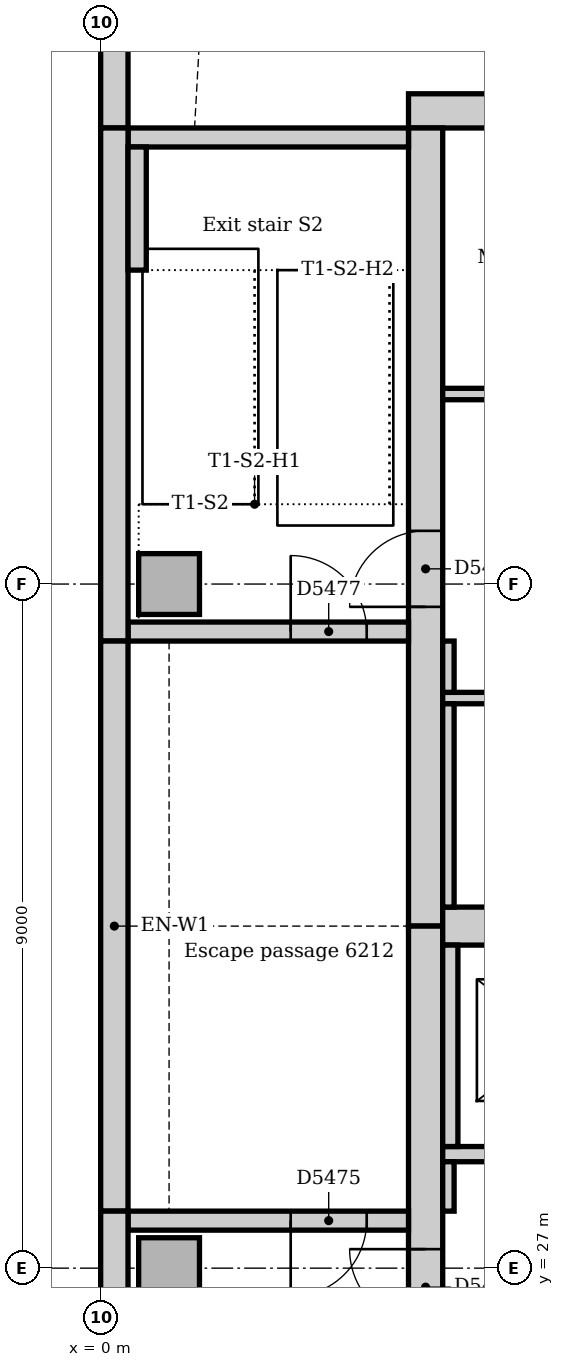
"""IFC4 building model, lengths in metres.
Left out: names, types, materials, properties, quantities, classifications, styles, units other than length and angle.
Written with IfcOpenShell. Run it as: python <this file> out.ifc"""

import sys

from ifc_helpers import new_model, si_unit, direction, frame, frame_2d, origin, origin_2d, place, context, subcontext, project, spatial, rectangle, extrude, element, fill, save


model = new_model("IFC4")
c1 = context("Model", 3, precision=1e-05, world=origin(), true_north=direction((0.0, 1.0)))
c2 = subcontext(c1, "Body", "Model", "MODEL_VIEW")
j1 = project(units=[si_unit("LENGTHUNIT", "METRE"), si_unit("PLANEANGLEUNIT", "RADIAN")], contexts=[c1])
p1 = place(None, origin())
s1 = spatial("IfcSite", under=j1, at=p1, CompositionType="ELEMENT")
p2 = place(p1, origin())
s2 = spatial("IfcBuilding", under=s1, at=p2, CompositionType="ELEMENT")
p3 = place(p2, frame((0.0, 0.0, 259.0)))
s3 = spatial("IfcBuildingStorey", under=s2, at=p3, CompositionType="ELEMENT", Elevation=259.0)
p4 = place(p3, frame((22.95, 42.225, 0.0), z_axis=(0.0, 0.0, 1.0), x_axis=(-1.0, 0.0, 0.0)))
e1 = element("IfcWall", 1, at=p4, inside=s3, PredefinedType="SOLIDWALL", context=c2, shape_type="SweptSolid", body=[
    extrude(rectangle(XDim=18.9, YDim=0.45, at=frame_2d((9.45, 0.0))), origin(), (0.0, 0.0, 1.0), 4.0),
])
p5 = place(p3, frame((4.275, 42.0, 0.0), z_axis=(0.0, 0.0, 1.0), x_axis=(0.0, -1.0, 0.0)))
e2 = element("IfcWall", 2, at=p5, inside=s3, PredefinedType="SOLIDWALL", context=c2, shape_type="SweptSolid", body=[
    extrude(rectangle(XDim=10.5, YDim=0.45, at=frame_2d((5.25, 0.0))), origin(), (0.0, 0.0, 1.0), 4.0),
])
p6 = place(p5, frame((5.3, 0.0, 0.0)))
e3 = element("IfcOpeningElement", 3, at=p6, cuts=e2, PredefinedType="OPENING", context=c2, shape_type="SweptSolid", body=[
    extrude(rectangle(XDim=1.0, YDim=2.1, at=frame_2d((0.5, 1.05))), frame((0.0, 0.235, 0.0), z_axis=(0.0, -1.0, 0.0), x_axis=(1.0, 0.0, 0.0)), (0.0, 0.0, 1.0), 0.47),
])
p7 = place(p3, frame((4.275, 31.5, 0.0), z_axis=(0.0, 0.0, 1.0), x_axis=(0.0, -1.0, 0.0)))
e4 = element("IfcWall", 4, at=p7, inside=s3, PredefinedType="SOLIDWALL", context=c2, shape_type="SweptSolid", body=[
    extrude(rectangle(XDim=10.5, YDim=0.45, at=frame_2d((5.25, 0.0))), origin(), (0.0, 0.0, 1.0), 4.0),
])
p8 = place(p7, frame((4.25, 0.0, 0.0)))
e5 = element("IfcOpeningElement", 5, at=p8, cuts=e4, PredefinedType="OPENING", context=c2, shape_type="SweptSolid", body=[
    extrude(rectangle(XDim=1.0, YDim=2.1, at=frame_2d((0.5, 1.05))), frame((0.0, 0.235, 0.0), z_axis=(0.0, -1.0, 0.0), x_axis=(1.0, 0.0, 0.0)), (0.0, 0.0, 1.0), 0.47),
])
p9 = place(p3, frame((4.5, 31.5, 0.0), z_axis=(0.0, 0.0, 1.0), x_axis=(1.0, 0.0, 0.0)))
e6 = element("IfcWall", 6, at=p9, inside=s3, PredefinedType="SOLIDWALL", context=c2, shape_type="SweptSolid", body=[
    extrude(rectangle(XDim=18.0, YDim=0.5, at=frame_2d((9.0, 0.0))), origin(), (0.0, 0.0, 1.0), 4.0),
])
p10 = place(p3, frame((4.05, 27.625, 0.0), z_axis=(0.0, 0.0, 1.0), x_axis=(-1.0, 0.0, 0.0)))
e7 = element("IfcWall", 7, at=p10, inside=s3, PredefinedType="SOLIDWALL", context=c2, shape_type="SweptSolid", body=[
    extrude(rectangle(XDim=3.69, YDim=0.25, at=frame_2d((1.845, 0.0))), origin(), (0.0, 0.0, 1.0), 4.0),
])
p11 = place(p10, frame((0.55, 0.0, 0.0)))
e8 = element("IfcOpeningElement", 8, at=p11, cuts=e7, PredefinedType="OPENING", context=c2, shape_type="SweptSolid", body=[
    extrude(rectangle(XDim=1.0, YDim=2.1, at=frame_2d((0.5, 1.05))), frame((0.0, 0.135, 0.0), z_axis=(0.0, -1.0, 0.0), x_axis=(1.0, 0.0, 0.0)), (0.0, 0.0, 1.0), 0.27),
])
p12 = place(p3, frame((0.36, 35.375, 0.0), z_axis=(0.0, 0.0, 1.0), x_axis=(1.0, 0.0, 0.0)))
e9 = element("IfcWall", 9, at=p12, inside=s3, PredefinedType="SOLIDWALL", context=c2, shape_type="SweptSolid", body=[
    extrude(rectangle(XDim=3.69, YDim=0.25, at=frame_2d((1.845, 0.0))), origin(), (0.0, 0.0, 1.0), 4.0),
])
p13 = place(p12, frame((2.14, 0.0, 0.0)))
e10 = element("IfcOpeningElement", 10, at=p13, cuts=e9, PredefinedType="OPENING", context=c2, shape_type="SweptSolid", body=[
    extrude(rectangle(XDim=1.0, YDim=2.1, at=frame_2d((0.5, 1.05))), frame((0.0, 0.135, 0.0), z_axis=(0.0, -1.0, 0.0), x_axis=(1.0, 0.0, 0.0)), (0.0, 0.0, 1.0), 0.27),
])
p14 = place(p3, frame((4.05, 41.875, 0.0), z_axis=(0.0, 0.0, 1.0), x_axis=(-1.0, 0.0, 0.0)))
e11 = element("IfcWall", 11, at=p14, inside=s3, PredefinedType="SOLIDWALL", context=c2, shape_type="SweptSolid", body=[
    extrude(rectangle(XDim=3.69, YDim=0.25, at=frame_2d((1.845, 0.0))), origin(), (0.0, 0.0, 1.0), 4.0),
])
for number, where, z_axis, x_axis in (
    (12, (0.9, 27.0, 0.0), (0.0, 0.0, 1.0), (1.0, 0.0, 0.0)),
    (13, (0.9, 36.0, 0.0), (0.0, 0.0, 1.0), (1.0, 0.0, 0.0)),
):
    element("IfcColumn", number, at=place(p3, frame(where, z_axis=z_axis, x_axis=x_axis)), inside=s3, PredefinedType="COLUMN", context=c2, shape_type="SweptSolid", body=[
        extrude(rectangle(XDim=0.8, YDim=0.8, at=origin_2d()), origin(), (0.0, 0.0, 1.0), 4.0),
    ])
p15 = place(p3, frame((0.18, 58.757, 0.0), z_axis=(0.0, 0.0, 1.0), x_axis=(0.0, -1.0, 0.0)))
e14 = element("IfcWall", 14, at=p15, inside=s3, PredefinedType="STANDARD", context=c2, shape_type="SweptSolid", body=[
    extrude(rectangle(XDim=16.757, YDim=0.36, at=frame_2d((8.379, 0.0))), origin(), (0.0, 0.0, 1.0), 3.85),
])
p16 = place(p15, frame((3.107, 0.0, 0.9)))
e15 = element("IfcOpeningElement", 15, at=p16, cuts=e14, PredefinedType="OPENING", context=c2, shape_type="SweptSolid", body=[
    extrude(rectangle(XDim=3.3, YDim=1.6, at=frame_2d((1.65, 0.8))), frame((0.0, 0.19, 0.0), z_axis=(0.0, -1.0, 0.0), x_axis=(1.0, 0.0, 0.0)), (0.0, 0.0, 1.0), 0.38),
])
p17 = place(p15, frame((7.607, 0.0, 0.9)))
e16 = element("IfcOpeningElement", 16, at=p17, cuts=e14, PredefinedType="OPENING", context=c2, shape_type="SweptSolid", body=[
    extrude(rectangle(XDim=3.3, YDim=1.6, at=frame_2d((1.65, 0.8))), frame((0.0, 0.19, 0.0), z_axis=(0.0, -1.0, 0.0), x_axis=(1.0, 0.0, 0.0)), (0.0, 0.0, 1.0), 0.38),
])
p18 = place(p15, frame((12.107, 0.0, 0.9)))
e17 = element("IfcOpeningElement", 17, at=p18, cuts=e14, PredefinedType="OPENING", context=c2, shape_type="SweptSolid", body=[
    extrude(rectangle(XDim=3.3, YDim=1.6, at=frame_2d((1.65, 0.8))), frame((0.0, 0.19, 0.0), z_axis=(0.0, -1.0, 0.0), x_axis=(1.0, 0.0, 0.0)), (0.0, 0.0, 1.0), 0.38),
])
p19 = place(p3, frame((0.18, 42.0, 0.0), z_axis=(0.0, 0.0, 1.0), x_axis=(0.0, -1.0, 0.0)))
e18 = element("IfcWall", 18, at=p19, inside=s3, PredefinedType="STANDARD", context=c2, shape_type="SweptSolid", body=[
    extrude(rectangle(XDim=6.75, YDim=0.36, at=frame_2d((3.375, 0.0))), origin(), (0.0, 0.0, 1.0), 3.85),
])
p20 = place(p3, frame((0.18, 35.25, 0.0), z_axis=(0.0, 0.0, 1.0), x_axis=(0.0, -1.0, 0.0)))
e19 = element("IfcWall", 19, at=p20, inside=s3, PredefinedType="STANDARD", context=c2, shape_type="SweptSolid", body=[
    extrude(rectangle(XDim=7.5, YDim=0.36, at=frame_2d((3.75, 0.0))), origin(), (0.0, 0.0, 1.0), 3.85),
])
p21 = place(p3, frame((0.18, 27.75, 0.0), z_axis=(0.0, 0.0, 1.0), x_axis=(0.0, -1.0, 0.0)))
e20 = element("IfcWall", 20, at=p21, inside=s3, PredefinedType="STANDARD", context=c2, shape_type="SweptSolid", body=[
    extrude(rectangle(XDim=5.507, YDim=0.36, at=frame_2d((2.754, 0.0))), origin(), (0.0, 0.0, 1.0), 3.85),
])
p22 = place(p3, frame((0.48, 40.13, 0.0), z_axis=(0.0, 0.0, 1.0), x_axis=(0.0, 1.0, 0.0)))
e21 = element("IfcWall", 21, at=p22, inside=s3, PredefinedType="STANDARD", context=c2, shape_type="SweptSolid", body=[
    extrude(rectangle(XDim=1.62, YDim=0.24, at=frame_2d((0.81, 0.0))), origin(), (0.0, 0.0, 1.0), 4.0),
])
p23 = place(p3, frame((4.5, 28.5, 0.0), z_axis=(0.0, 0.0, 1.0), x_axis=(1.0, 0.0, 0.0)))
e22 = element("IfcWall", 22, at=p23, inside=s3, PredefinedType="PARTITIONING", context=c2, shape_type="SweptSolid", body=[
    extrude(rectangle(XDim=18.0, YDim=0.2, at=frame_2d((9.0, 0.0))), origin(), (0.0, 0.0, 1.0), 3.85),
])
p24 = place(p23, frame((0.95, 0.0, 0.0)))
e23 = element("IfcOpeningElement", 23, at=p24, cuts=e22, PredefinedType="OPENING", context=c2, shape_type="SweptSolid", body=[
    extrude(rectangle(XDim=1.1, YDim=2.1, at=frame_2d((0.55, 1.05))), frame((0.0, 0.11, 0.0), z_axis=(0.0, -1.0, 0.0), x_axis=(1.0, 0.0, 0.0)), (0.0, 0.0, 1.0), 0.22),
])
p25 = place(p23, frame((3.95, 0.0, 0.0)))
e24 = element("IfcOpeningElement", 24, at=p25, cuts=e22, PredefinedType="OPENING", context=c2, shape_type="SweptSolid", body=[
    extrude(rectangle(XDim=1.1, YDim=2.1, at=frame_2d((0.55, 1.05))), frame((0.0, 0.11, 0.0), z_axis=(0.0, -1.0, 0.0), x_axis=(1.0, 0.0, 0.0)), (0.0, 0.0, 1.0), 0.22),
])
p26 = place(p23, frame((6.95, 0.0, 0.0)))
e25 = element("IfcOpeningElement", 25, at=p26, cuts=e22, PredefinedType="OPENING", context=c2, shape_type="SweptSolid", body=[
    extrude(rectangle(XDim=1.1, YDim=2.1, at=frame_2d((0.55, 1.05))), frame((0.0, 0.11, 0.0), z_axis=(0.0, -1.0, 0.0), x_axis=(1.0, 0.0, 0.0)), (0.0, 0.0, 1.0), 0.22),
])
p27 = place(p23, frame((9.95, 0.0, 0.0)))
e26 = element("IfcOpeningElement", 26, at=p27, cuts=e22, PredefinedType="OPENING", context=c2, shape_type="SweptSolid", body=[
    extrude(rectangle(XDim=1.1, YDim=2.1, at=frame_2d((0.55, 1.05))), frame((0.0, 0.11, 0.0), z_axis=(0.0, -1.0, 0.0), x_axis=(1.0, 0.0, 0.0)), (0.0, 0.0, 1.0), 0.22),
])
p28 = place(p23, frame((12.95, 0.0, 0.0)))
e27 = element("IfcOpeningElement", 27, at=p28, cuts=e22, PredefinedType="OPENING", context=c2, shape_type="SweptSolid", body=[
    extrude(rectangle(XDim=1.1, YDim=2.1, at=frame_2d((0.55, 1.05))), frame((0.0, 0.11, 0.0), z_axis=(0.0, -1.0, 0.0), x_axis=(1.0, 0.0, 0.0)), (0.0, 0.0, 1.0), 0.22),
])
p29 = place(p23, frame((15.95, 0.0, 0.0)))
e28 = element("IfcOpeningElement", 28, at=p29, cuts=e22, PredefinedType="OPENING", context=c2, shape_type="SweptSolid", body=[
    extrude(rectangle(XDim=1.1, YDim=2.1, at=frame_2d((0.55, 1.05))), frame((0.0, 0.11, 0.0), z_axis=(0.0, -1.0, 0.0), x_axis=(1.0, 0.0, 0.0)), (0.0, 0.0, 1.0), 0.22),
])
p30 = place(p3, frame((4.6, 28.6, 0.0), z_axis=(0.0, 0.0, 1.0), x_axis=(0.0, 1.0, 0.0)))
e29 = element("IfcWall", 29, at=p30, inside=s3, PredefinedType="PARTITIONING", context=c2, shape_type="SweptSolid", body=[
    extrude(rectangle(XDim=2.65, YDim=0.2, at=frame_2d((1.325, 0.0))), origin(), (0.0, 0.0, 1.0), 3.85),
])
p31 = place(p3, frame((4.5, 38.5, 0.0), z_axis=(0.0, 0.0, 1.0), x_axis=(1.0, 0.0, 0.0)))
e30 = element("IfcWall", 30, at=p31, inside=s3, PredefinedType="PARTITIONING", context=c2, shape_type="SweptSolid", body=[
    extrude(rectangle(XDim=11.9, YDim=0.15, at=frame_2d((5.95, 0.0))), origin(), (0.0, 0.0, 1.0), 3.85),
])
p32 = place(p31, frame((1.1, 0.0, 0.0)))
e31 = element("IfcOpeningElement", 31, at=p32, cuts=e30, PredefinedType="OPENING", context=c2, shape_type="SweptSolid", body=[
    extrude(rectangle(XDim=0.9, YDim=2.1, at=frame_2d((0.45, 1.05))), frame((0.0, 0.085, 0.0), z_axis=(0.0, -1.0, 0.0), x_axis=(1.0, 0.0, 0.0)), (0.0, 0.0, 1.0), 0.17),
])
p33 = place(p31, frame((4.05, 0.0, 0.0)))
e32 = element("IfcOpeningElement", 32, at=p33, cuts=e30, PredefinedType="OPENING", context=c2, shape_type="SweptSolid", body=[
    extrude(rectangle(XDim=0.9, YDim=2.1, at=frame_2d((0.45, 1.05))), frame((0.0, 0.085, 0.0), z_axis=(0.0, -1.0, 0.0), x_axis=(1.0, 0.0, 0.0)), (0.0, 0.0, 1.0), 0.17),
])
p34 = place(p31, frame((7.05, 0.0, 0.0)))
e33 = element("IfcOpeningElement", 33, at=p34, cuts=e30, PredefinedType="OPENING", context=c2, shape_type="SweptSolid", body=[
    extrude(rectangle(XDim=0.9, YDim=2.1, at=frame_2d((0.45, 1.05))), frame((0.0, 0.085, 0.0), z_axis=(0.0, -1.0, 0.0), x_axis=(1.0, 0.0, 0.0)), (0.0, 0.0, 1.0), 0.17),
])
p35 = place(p31, frame((9.95, 0.0, 0.0)))
e34 = element("IfcOpeningElement", 34, at=p35, cuts=e30, PredefinedType="OPENING", context=c2, shape_type="SweptSolid", body=[
    extrude(rectangle(XDim=0.8, YDim=2.1, at=frame_2d((0.4, 1.05))), frame((0.0, 0.085, 0.0), z_axis=(0.0, -1.0, 0.0), x_axis=(1.0, 0.0, 0.0)), (0.0, 0.0, 1.0), 0.17),
])
p36 = place(p3, frame((4.5, 34.5, 0.0), z_axis=(0.0, 0.0, 1.0), x_axis=(1.0, 0.0, 0.0)))
e35 = element("IfcWall", 35, at=p36, inside=s3, PredefinedType="PARTITIONING", context=c2, shape_type="SweptSolid", body=[
    extrude(rectangle(XDim=5.9, YDim=0.15, at=frame_2d((2.95, 0.0))), origin(), (0.0, 0.0, 1.0), 3.85),
])
p37 = place(p36, frame((2.5, 0.0, 0.0)))
e36 = element("IfcOpeningElement", 36, at=p37, cuts=e35, PredefinedType="OPENING", context=c2, shape_type="SweptSolid", body=[
    extrude(rectangle(XDim=0.9, YDim=2.1, at=frame_2d((0.45, 1.05))), frame((0.0, 0.085, 0.0), z_axis=(0.0, -1.0, 0.0), x_axis=(1.0, 0.0, 0.0)), (0.0, 0.0, 1.0), 0.17),
])
p38 = place(p3, frame((4.575, 34.575, 0.0), z_axis=(0.0, 0.0, 1.0), x_axis=(0.0, 1.0, 0.0)))
e37 = element("IfcWall", 37, at=p38, inside=s3, PredefinedType="PARTITIONING", context=c2, shape_type="SweptSolid", body=[
    extrude(rectangle(XDim=0.675, YDim=0.15, at=frame_2d((0.338, 0.0))), origin(), (0.0, 0.0, 1.0), 3.85),
])
p39 = place(p3, frame((4.575, 31.75, 0.0), z_axis=(0.0, 0.0, 1.0), x_axis=(0.0, 1.0, 0.0)))
e38 = element("IfcWall", 38, at=p39, inside=s3, PredefinedType="PARTITIONING", context=c2, shape_type="SweptSolid", body=[
    extrude(rectangle(XDim=2.675, YDim=0.15, at=frame_2d((1.337, 0.0))), origin(), (0.0, 0.0, 1.0), 3.85),
])
p40 = place(p3, frame((4.575, 27.75, 0.0), z_axis=(0.0, 0.0, 1.0), x_axis=(0.0, 1.0, 0.0)))
e39 = element("IfcWall", 39, at=p40, inside=s3, PredefinedType="PARTITIONING", context=c2, shape_type="SweptSolid", body=[
    extrude(rectangle(XDim=0.65, YDim=0.15, at=frame_2d((0.325, 0.0))), origin(), (0.0, 0.0, 1.0), 3.85),
])
p41 = place(p8, frame((1.0, 0.0, 0.0), z_axis=(0.0, 0.0, 1.0), x_axis=(-1.0, 0.0, 0.0)))
e40 = element("IfcDoor", 40, at=p41, inside=s3, OperationType="SINGLE_SWING_RIGHT", PredefinedType="DOOR", context=c2, shape_type="SweptSolid", body=[
    extrude(rectangle(XDim=1.0, YDim=2.1, at=frame_2d((0.5, 1.05))), frame((0.0, 0.025, 0.0), z_axis=(0.0, -1.0, 0.0), x_axis=(1.0, 0.0, 0.0)), (0.0, 0.0, 1.0), 0.05),
])
fill(e5, e40)
p42 = place(p11, origin())
e41 = element("IfcDoor", 41, at=p42, inside=s3, OperationType="SINGLE_SWING_RIGHT", PredefinedType="DOOR", context=c2, shape_type="SweptSolid", body=[
    extrude(rectangle(XDim=1.0, YDim=2.1, at=frame_2d((0.5, 1.05))), frame((0.0, 0.025, 0.0), z_axis=(0.0, -1.0, 0.0), x_axis=(1.0, 0.0, 0.0)), (0.0, 0.0, 1.0), 0.05),
])
fill(e8, e41)
p43 = place(p6, frame((1.0, 0.0, 0.0), z_axis=(0.0, 0.0, 1.0), x_axis=(-1.0, 0.0, 0.0)))
e42 = element("IfcDoor", 42, at=p43, inside=s3, OperationType="SINGLE_SWING_LEFT", PredefinedType="DOOR", context=c2, shape_type="SweptSolid", body=[
    extrude(rectangle(XDim=1.0, YDim=2.1, at=frame_2d((0.5, 1.05))), frame((0.0, 0.025, 0.0), z_axis=(0.0, -1.0, 0.0), x_axis=(1.0, 0.0, 0.0)), (0.0, 0.0, 1.0), 0.05),
])
fill(e3, e42)
p44 = place(p13, origin())
e43 = element("IfcDoor", 43, at=p44, inside=s3, OperationType="SINGLE_SWING_LEFT", PredefinedType="DOOR", context=c2, shape_type="SweptSolid", body=[
    extrude(rectangle(XDim=1.0, YDim=2.1, at=frame_2d((0.5, 1.05))), frame((0.0, 0.025, 0.0), z_axis=(0.0, -1.0, 0.0), x_axis=(1.0, 0.0, 0.0)), (0.0, 0.0, 1.0), 0.05),
])
fill(e10, e43)
save(model, sys.argv[1])
